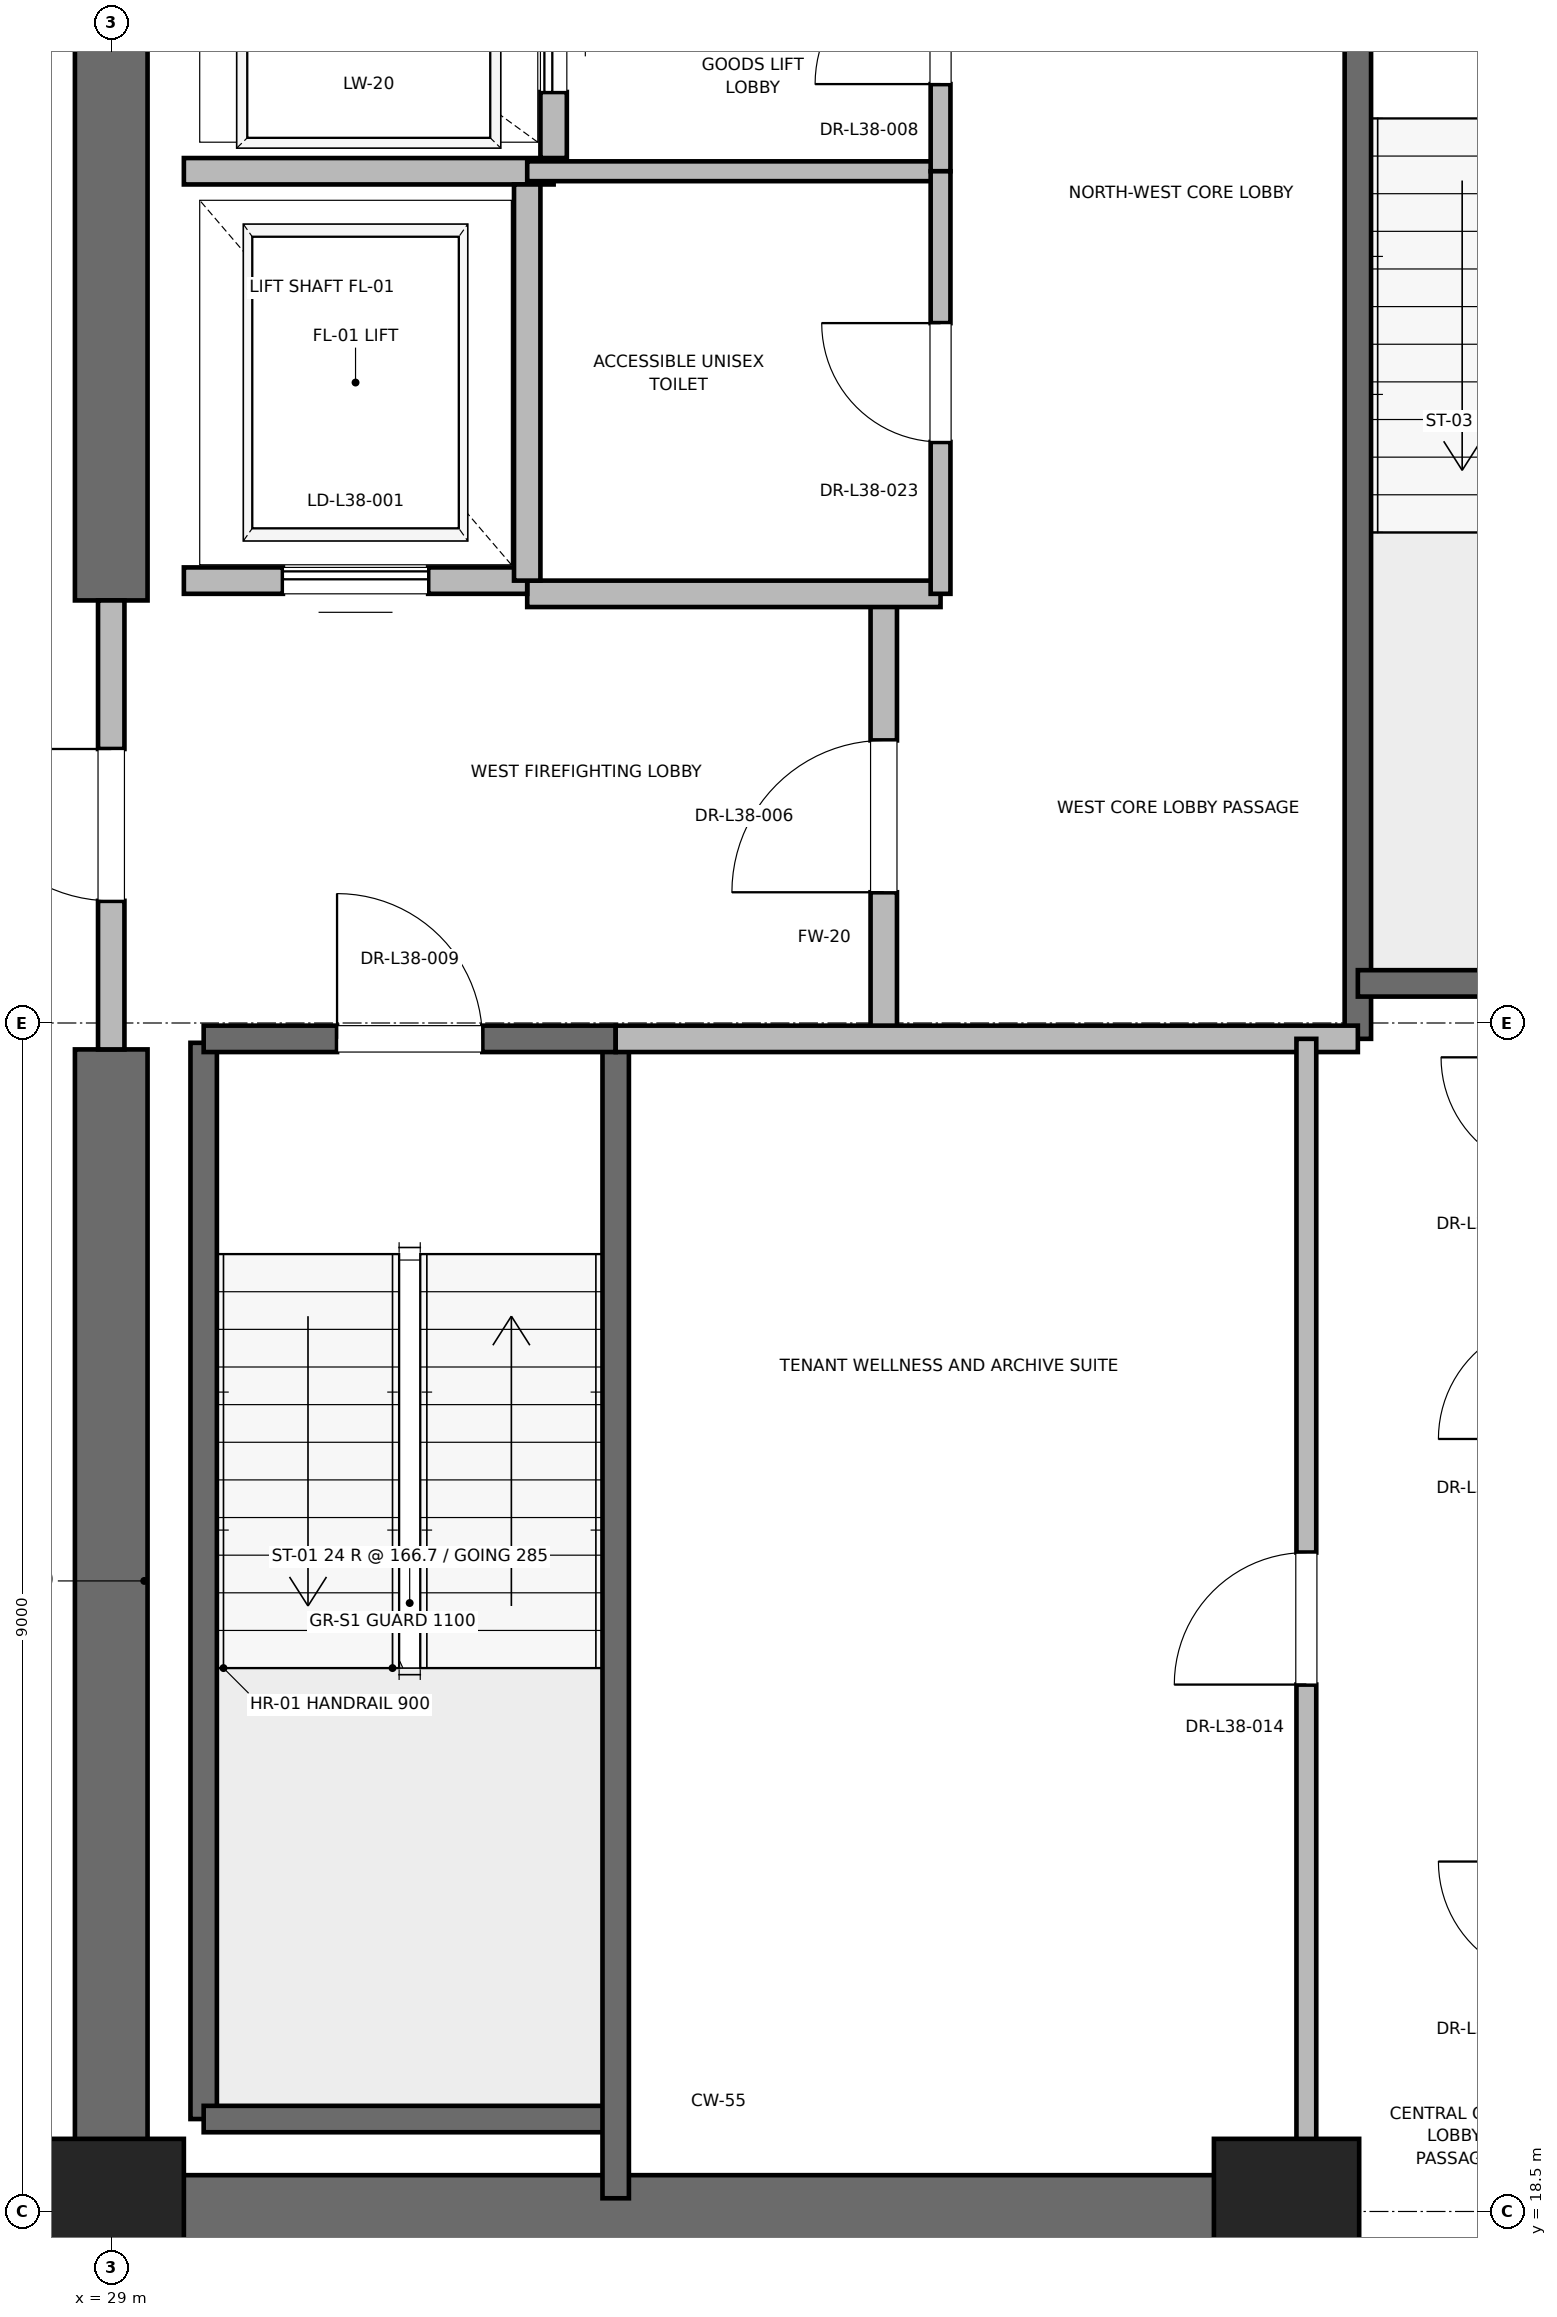
"""IFC4 building model, lengths in metres.
Left out: names, types, materials, properties, quantities, classifications, styles, units other than length and angle.
Written with IfcOpenShell. Run it as: python <this file> out.ifc"""

import sys

from ifc_helpers import new_model, si_unit, direction, frame, frame_2d, origin, origin_2d, place, context, subcontext, project, spatial, rectangle, extrude, element, fill, save


model = new_model("IFC4")
c1 = context("Model", 3, precision=1e-05, world=origin(), true_north=direction((0.0, 1.0)))
c2 = subcontext(c1, "Body", "Model", "MODEL_VIEW")
j1 = project(units=[si_unit("LENGTHUNIT", "METRE"), si_unit("PLANEANGLEUNIT", "RADIAN")], contexts=[c1])
p1 = place(None, origin())
s1 = spatial("IfcSite", under=j1, at=p1, CompositionType="ELEMENT")
p2 = place(p1, origin())
s2 = spatial("IfcBuilding", under=s1, at=p2, CompositionType="ELEMENT")
p3 = place(p2, frame((0.0, 0.0, 164.4)))
s3 = spatial("IfcBuildingStorey", under=s2, at=p3, CompositionType="ELEMENT", Elevation=164.4)
for number, where, z_axis, x_axis in (
    (1, (29.0, 18.5, 0.0), (0.0, 0.0, 1.0), (1.0, 0.0, 0.0)),
    (2, (37.9, 18.5, 0.0), (0.0, 0.0, 1.0), (1.0, 0.0, 0.0)),
):
    element("IfcColumn", number, at=place(p3, frame(where, z_axis=z_axis, x_axis=x_axis)), inside=s3, PredefinedType="PILASTER", context=c2, shape_type="SweptSolid", body=[
        extrude(rectangle(XDim=1.1, YDim=1.1, at=origin_2d()), origin(), (0.0, 0.0, 1.0), 4.0),
    ])
p4 = place(p3, frame((29.0, 18.5, 0.0), z_axis=(0.0, 0.0, 1.0), x_axis=(1.0, 0.0, 0.0)))
e3 = element("IfcWall", 3, at=p4, inside=s3, PredefinedType="SHEAR", context=c2, shape_type="SweptSolid", body=[
    extrude(rectangle(XDim=9.2, YDim=0.55, at=frame_2d((4.6, 0.0))), origin(), (0.0, 0.0, 1.0), 3.775),
])
p5 = place(p3, frame((29.0, 18.5, 0.0), z_axis=(0.0, 0.0, 1.0), x_axis=(0.0, 1.0, 0.0)))
e4 = element("IfcWall", 4, at=p5, inside=s3, PredefinedType="SHEAR", context=c2, shape_type="SweptSolid", body=[
    extrude(rectangle(XDim=8.8, YDim=0.55, at=frame_2d((4.4, 0.0))), origin(), (0.0, 0.0, 1.0), 3.775),
])
p6 = place(p3, frame((29.0, 30.7, 0.0), z_axis=(0.0, 0.0, 1.0), x_axis=(0.0, 1.0, 0.0)))
e5 = element("IfcWall", 5, at=p6, inside=s3, PredefinedType="SHEAR", context=c2, shape_type="SweptSolid", body=[
    extrude(rectangle(XDim=5.8, YDim=0.55, at=frame_2d((2.9, 0.0))), origin(), (0.0, 0.0, 1.0), 3.775),
])
p7 = place(p3, frame((29.7, 19.2, 0.0), z_axis=(0.0, 0.0, 1.0), x_axis=(0.0, 1.0, 0.0)))
e6 = element("IfcWall", 6, at=p7, inside=s3, PredefinedType="SOLIDWALL", context=c2, shape_type="SweptSolid", body=[
    extrude(rectangle(XDim=8.15, YDim=0.2, at=frame_2d((4.075, 0.0))), origin(), (0.0, 0.0, 1.0), 3.775),
])
p8 = place(p3, frame((29.7, 19.2, 0.0), z_axis=(0.0, 0.0, 1.0), x_axis=(1.0, 0.0, 0.0)))
e7 = element("IfcWall", 7, at=p8, inside=s3, PredefinedType="SOLIDWALL", context=c2, shape_type="SweptSolid", body=[
    extrude(rectangle(XDim=3.12, YDim=0.2, at=frame_2d((1.56, 0.0))), origin(), (0.0, 0.0, 1.0), 3.775),
])
p9 = place(p3, frame((32.82, 18.6, 0.0), z_axis=(0.0, 0.0, 1.0), x_axis=(0.0, 1.0, 0.0)))
e8 = element("IfcWall", 8, at=p9, inside=s3, PredefinedType="SOLIDWALL", context=c2, shape_type="SweptSolid", body=[
    extrude(rectangle(XDim=8.78, YDim=0.2, at=frame_2d((4.39, 0.0))), origin(), (0.0, 0.0, 1.0), 3.775),
])
p10 = place(p3, frame((29.7, 27.38, 0.0), z_axis=(0.0, 0.0, 1.0), x_axis=(1.0, 0.0, 0.0)))
e9 = element("IfcWall", 9, at=p10, inside=s3, PredefinedType="SOLIDWALL", context=c2, shape_type="SweptSolid", body=[
    extrude(rectangle(XDim=3.12, YDim=0.2, at=frame_2d((1.56, 0.0))), origin(), (0.0, 0.0, 1.0), 3.775),
])
p11 = place(p10, frame((1.01, 0.0, 0.0)))
e10 = element("IfcOpeningElement", 10, at=p11, cuts=e9, PredefinedType="OPENING", context=c2, shape_type="SweptSolid", body=[
    extrude(rectangle(XDim=1.1, YDim=2.15, at=frame_2d((0.55, 1.075))), frame((0.0, 0.1, 0.0), z_axis=(0.0, -1.0, 0.0), x_axis=(1.0, 0.0, 0.0)), (0.0, 0.0, 1.0), 0.2),
])
p12 = place(p3, frame((38.44, 27.38, 0.0), z_axis=(0.0, 0.0, 1.0), x_axis=(0.0, 1.0, 0.0)))
e11 = element("IfcWall", 11, at=p12, inside=s3, PredefinedType="SOLIDWALL", context=c2, shape_type="SweptSolid", body=[
    extrude(rectangle(XDim=8.87, YDim=0.2, at=frame_2d((4.435, 0.0))), origin(), (0.0, 0.0, 1.0), 3.775),
])
p13 = place(p3, frame((38.44, 27.8, 0.0), z_axis=(0.0, 0.0, 1.0), x_axis=(1.0, 0.0, 0.0)))
e12 = element("IfcWall", 12, at=p13, inside=s3, PredefinedType="SOLIDWALL", context=c2, shape_type="SweptSolid", body=[
    extrude(rectangle(XDim=3.32, YDim=0.2, at=frame_2d((1.66, 0.0))), origin(), (0.0, 0.0, 1.0), 3.775),
])
p14 = place(p3, frame((34.85, 27.38, 0.0), z_axis=(0.0, 0.0, 1.0), x_axis=(0.0, 1.0, 0.0)))
e13 = element("IfcWall", 13, at=p14, inside=s3, PredefinedType="PARTITIONING", context=c2, shape_type="SweptSolid", body=[
    extrude(rectangle(XDim=3.37, YDim=0.2, at=frame_2d((1.685, 0.0))), origin(), (0.0, 0.0, 1.0), 3.775),
])
p15 = place(p14, frame((1.11, 0.0, 0.0)))
e14 = element("IfcOpeningElement", 14, at=p15, cuts=e13, PredefinedType="OPENING", context=c2, shape_type="SweptSolid", body=[
    extrude(rectangle(XDim=1.15, YDim=2.2, at=frame_2d((0.575, 1.1))), frame((0.0, 0.1, 0.0), z_axis=(0.0, -1.0, 0.0), x_axis=(1.0, 0.0, 0.0)), (0.0, 0.0, 1.0), 0.2),
])
p16 = place(p3, frame((29.0, 27.3, 0.0), z_axis=(0.0, 0.0, 1.0), x_axis=(0.0, 1.0, 0.0)))
e15 = element("IfcWall", 15, at=p16, inside=s3, PredefinedType="PARTITIONING", context=c2, shape_type="SweptSolid", body=[
    extrude(rectangle(XDim=3.4, YDim=0.2, at=frame_2d((1.7, 0.0))), origin(), (0.0, 0.0, 1.0), 2.755),
])
p17 = place(p16, frame((1.125, 0.0, 0.0)))
e16 = element("IfcOpeningElement", 16, at=p17, cuts=e15, PredefinedType="OPENING", context=c2, shape_type="SweptSolid", body=[
    extrude(rectangle(XDim=1.15, YDim=2.2, at=frame_2d((0.575, 1.1))), frame((0.0, 0.1, 0.0), z_axis=(0.0, -1.0, 0.0), x_axis=(1.0, 0.0, 0.0)), (0.0, 0.0, 1.0), 0.2),
])
p18 = place(p3, frame((32.82, 27.38, 0.0), z_axis=(0.0, 0.0, 1.0), x_axis=(1.0, 0.0, 0.0)))
e17 = element("IfcWall", 17, at=p18, inside=s3, PredefinedType="PARTITIONING", context=c2, shape_type="SweptSolid", body=[
    extrude(rectangle(XDim=5.62, YDim=0.2, at=frame_2d((2.81, 0.0))), origin(), (0.0, 0.0, 1.0), 3.775),
])
p19 = place(p3, frame((32.15, 30.75, 0.0), z_axis=(0.0, 0.0, 1.0), x_axis=(1.0, 0.0, 0.0)))
e18 = element("IfcWall", 18, at=p19, inside=s3, PredefinedType="PARTITIONING", context=c2, shape_type="SweptSolid", body=[
    extrude(rectangle(XDim=3.13, YDim=0.2, at=frame_2d((1.565, 0.0))), origin(), (0.0, 0.0, 1.0), 3.775),
])
p20 = place(p3, frame((29.55, 30.85, 0.0), z_axis=(0.0, 0.0, 1.0), x_axis=(1.0, 0.0, 0.0)))
e19 = element("IfcWall", 19, at=p20, inside=s3, PredefinedType="SOLIDWALL", context=c2, shape_type="SweptSolid", body=[
    extrude(rectangle(XDim=2.6, YDim=0.2, at=frame_2d((1.3, 0.0))), origin(), (0.0, 0.0, 1.0), 2.755),
])
p21 = place(p20, frame((0.75, 0.0, 0.0)))
e20 = element("IfcOpeningElement", 20, at=p21, cuts=e19, PredefinedType="OPENING", context=c2, shape_type="SweptSolid", body=[
    extrude(rectangle(XDim=1.1, YDim=2.2, at=frame_2d((0.55, 1.1))), frame((0.0, 0.1, 0.0), z_axis=(0.0, -1.0, 0.0), x_axis=(1.0, 0.0, 0.0)), (0.0, 0.0, 1.0), 0.2),
])
p22 = place(p3, frame((29.55, 33.95, 0.0), z_axis=(0.0, 0.0, 1.0), x_axis=(1.0, 0.0, 0.0)))
e21 = element("IfcWall", 21, at=p22, inside=s3, PredefinedType="SOLIDWALL", context=c2, shape_type="SweptSolid", body=[
    extrude(rectangle(XDim=2.8, YDim=0.2, at=frame_2d((1.4, 0.0))), origin(), (0.0, 0.0, 1.0), 3.775),
])
p23 = place(p3, frame((32.15, 30.85, 0.0), z_axis=(0.0, 0.0, 1.0), x_axis=(0.0, 1.0, 0.0)))
e22 = element("IfcWall", 22, at=p23, inside=s3, PredefinedType="SOLIDWALL", context=c2, shape_type="SweptSolid", body=[
    extrude(rectangle(XDim=3.0, YDim=0.2, at=frame_2d((1.5, 0.0))), origin(), (0.0, 0.0, 1.0), 3.775),
])
p24 = place(p3, frame((32.35, 34.05, 0.0), z_axis=(0.0, 0.0, 1.0), x_axis=(0.0, 1.0, 0.0)))
e23 = element("IfcWall", 23, at=p24, inside=s3, PredefinedType="SOLIDWALL", context=c2, shape_type="SweptSolid", body=[
    extrude(rectangle(XDim=2.1, YDim=0.2, at=frame_2d((1.05, 0.0))), origin(), (0.0, 0.0, 1.0), 3.775),
])
p25 = place(p24, frame((0.5, 0.0, 0.0)))
e24 = element("IfcOpeningElement", 24, at=p25, cuts=e23, PredefinedType="OPENING", context=c2, shape_type="SweptSolid", body=[
    extrude(rectangle(XDim=1.1, YDim=2.2, at=frame_2d((0.55, 1.1))), frame((0.0, 0.1, 0.0), z_axis=(0.0, -1.0, 0.0), x_axis=(1.0, 0.0, 0.0)), (0.0, 0.0, 1.0), 0.2),
])
p26 = place(p3, frame((32.15, 33.95, 0.0), z_axis=(0.0, 0.0, 1.0), x_axis=(1.0, 0.0, 0.0)))
e25 = element("IfcWall", 25, at=p26, inside=s3, PredefinedType="PARTITIONING", context=c2, shape_type="SweptSolid", body=[
    extrude(rectangle(XDim=3.13, YDim=0.15, at=frame_2d((1.565, 0.0))), origin(), (0.0, 0.0, 1.0), 2.85),
])
p27 = place(p3, frame((35.28, 33.95, 0.0), z_axis=(0.0, 0.0, 1.0), x_axis=(0.0, 1.0, 0.0)))
e26 = element("IfcWall", 26, at=p27, inside=s3, PredefinedType="PARTITIONING", context=c2, shape_type="SweptSolid", body=[
    extrude(rectangle(XDim=2.27, YDim=0.15, at=frame_2d((1.135, 0.0))), origin(), (0.0, 0.0, 1.0), 2.755),
])
p28 = place(p27, frame((0.66, 0.0, 0.0)))
e27 = element("IfcOpeningElement", 27, at=p28, cuts=e26, PredefinedType="OPENING", context=c2, shape_type="SweptSolid", body=[
    extrude(rectangle(XDim=0.95, YDim=2.15, at=frame_2d((0.475, 1.075))), frame((0.0, 0.075, 0.0), z_axis=(0.0, -1.0, 0.0), x_axis=(1.0, 0.0, 0.0)), (0.0, 0.0, 1.0), 0.15),
])
p29 = place(p3, frame((35.28, 30.75, 0.0), z_axis=(0.0, 0.0, 1.0), x_axis=(0.0, 1.0, 0.0)))
e28 = element("IfcWall", 28, at=p29, inside=s3, PredefinedType="PARTITIONING", context=c2, shape_type="SweptSolid", body=[
    extrude(rectangle(XDim=3.2, YDim=0.15, at=frame_2d((1.6, 0.0))), origin(), (0.0, 0.0, 1.0), 2.85),
])
p30 = place(p29, frame((1.15, 0.0, 0.0)))
e29 = element("IfcOpeningElement", 29, at=p30, cuts=e28, PredefinedType="OPENING", context=c2, shape_type="SweptSolid", body=[
    extrude(rectangle(XDim=0.9, YDim=2.1, at=frame_2d((0.45, 1.05))), frame((0.0, 0.075, 0.0), z_axis=(0.0, -1.0, 0.0), x_axis=(1.0, 0.0, 0.0)), (0.0, 0.0, 1.0), 0.15),
])
p31 = place(p3, frame((38.05, 18.6, 0.0), z_axis=(0.0, 0.0, 1.0), x_axis=(0.0, 1.0, 0.0)))
e30 = element("IfcWall", 30, at=p31, inside=s3, PredefinedType="PARTITIONING", context=c2, shape_type="SweptSolid", body=[
    extrude(rectangle(XDim=8.78, YDim=0.15, at=frame_2d((4.39, 0.0))), origin(), (0.0, 0.0, 1.0), 2.755),
])
p32 = place(p31, frame((3.89, 0.0, 0.0)))
e31 = element("IfcOpeningElement", 31, at=p32, cuts=e30, PredefinedType="OPENING", context=c2, shape_type="SweptSolid", body=[
    extrude(rectangle(XDim=1.0, YDim=2.15, at=frame_2d((0.5, 1.075))), frame((0.0, 0.075, 0.0), z_axis=(0.0, -1.0, 0.0), x_axis=(1.0, 0.0, 0.0)), (0.0, 0.0, 1.0), 0.15),
])
p33 = place(p11, origin())
e32 = element("IfcDoor", 32, at=p33, inside=s3, OperationType="SINGLE_SWING_LEFT", PredefinedType="DOOR", context=c2, shape_type="SweptSolid", body=[
    extrude(rectangle(XDim=1.1, YDim=2.15, at=frame_2d((0.55, 1.075))), frame((0.0, 0.025, 0.0), z_axis=(0.0, -1.0, 0.0), x_axis=(1.0, 0.0, 0.0)), (0.0, 0.0, 1.0), 0.05),
])
fill(e10, e32)
p34 = place(p15, origin())
e33 = element("IfcDoor", 33, at=p34, inside=s3, OperationType="SINGLE_SWING_LEFT", PredefinedType="DOOR", context=c2, shape_type="SweptSolid", body=[
    extrude(rectangle(XDim=1.15, YDim=2.2, at=frame_2d((0.575, 1.1))), frame((0.0, 0.025, 0.0), z_axis=(0.0, -1.0, 0.0), x_axis=(1.0, 0.0, 0.0)), (0.0, 0.0, 1.0), 0.05),
])
fill(e14, e33)
p35 = place(p17, origin())
e34 = element("IfcDoor", 34, at=p35, inside=s3, OperationType="SINGLE_SWING_RIGHT", PredefinedType="DOOR", context=c2, shape_type="SweptSolid", body=[
    extrude(rectangle(XDim=1.15, YDim=2.2, at=frame_2d((0.575, 1.1))), frame((0.0, 0.025, 0.0), z_axis=(0.0, -1.0, 0.0), x_axis=(1.0, 0.0, 0.0)), (0.0, 0.0, 1.0), 0.05),
])
fill(e16, e34)
p36 = place(p21, origin())
e35 = element("IfcDoor", 35, at=p36, inside=s3, OperationType="SLIDING_TO_RIGHT", PredefinedType="DOOR", context=c2, shape_type="SweptSolid", body=[
    extrude(rectangle(XDim=1.1, YDim=2.2, at=frame_2d((0.55, 1.1))), frame((0.0, 0.025, 0.0), z_axis=(0.0, -1.0, 0.0), x_axis=(1.0, 0.0, 0.0)), (0.0, 0.0, 1.0), 0.05),
])
fill(e20, e35)
p37 = place(p25, origin())
e36 = element("IfcDoor", 36, at=p37, inside=s3, OperationType="SLIDING_TO_RIGHT", PredefinedType="DOOR", context=c2, shape_type="SweptSolid", body=[
    extrude(rectangle(XDim=1.1, YDim=2.2, at=frame_2d((0.55, 1.1))), frame((0.0, 0.025, 0.0), z_axis=(0.0, -1.0, 0.0), x_axis=(1.0, 0.0, 0.0)), (0.0, 0.0, 1.0), 0.05),
])
fill(e24, e36)
p38 = place(p28, origin())
e37 = element("IfcDoor", 37, at=p38, inside=s3, OperationType="SINGLE_SWING_LEFT", PredefinedType="DOOR", context=c2, shape_type="SweptSolid", body=[
    extrude(rectangle(XDim=0.95, YDim=2.15, at=frame_2d((0.475, 1.075))), frame((0.0, 0.025, 0.0), z_axis=(0.0, -1.0, 0.0), x_axis=(1.0, 0.0, 0.0)), (0.0, 0.0, 1.0), 0.05),
])
fill(e27, e37)
p39 = place(p30, origin())
e38 = element("IfcDoor", 38, at=p39, inside=s3, OperationType="SINGLE_SWING_RIGHT", PredefinedType="DOOR", context=c2, shape_type="SweptSolid", body=[
    extrude(rectangle(XDim=0.9, YDim=2.1, at=frame_2d((0.45, 1.05))), frame((0.0, 0.025, 0.0), z_axis=(0.0, -1.0, 0.0), x_axis=(1.0, 0.0, 0.0)), (0.0, 0.0, 1.0), 0.05),
])
fill(e29, e38)
p40 = place(p32, origin())
e39 = element("IfcDoor", 39, at=p40, inside=s3, OperationType="SINGLE_SWING_LEFT", PredefinedType="DOOR", context=c2, shape_type="SweptSolid", body=[
    extrude(rectangle(XDim=1.0, YDim=2.15, at=frame_2d((0.5, 1.075))), frame((0.0, 0.025, 0.0), z_axis=(0.0, -1.0, 0.0), x_axis=(1.0, 0.0, 0.0)), (0.0, 0.0, 1.0), 0.05),
])
fill(e31, e39)
save(model, sys.argv[1])
